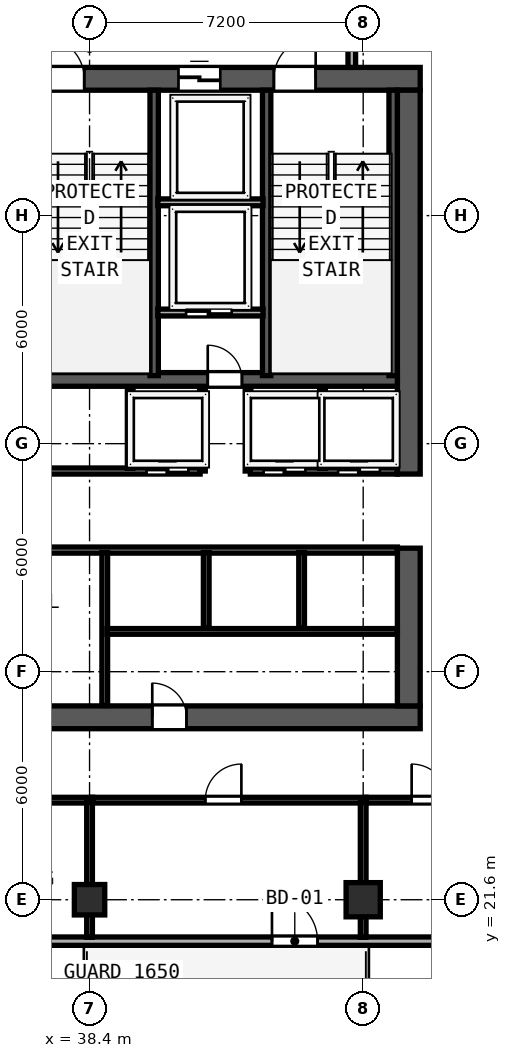
"""IFC4 building model, lengths in metres.
Left out: names, types, materials, properties, quantities, classifications, styles, units other than length and angle.
Written with IfcOpenShell. Run it as: python <this file> out.ifc"""

import sys

from ifc_helpers import new_model, si_unit, direction, frame, frame_2d, origin, origin_2d, place, context, subcontext, project, spatial, rectangle, hollow_rectangle, extrude, element, fill, save


model = new_model("IFC4")
c1 = context("Model", 3, precision=1e-05, world=origin(), true_north=direction((0.0, 1.0)))
c2 = subcontext(c1, "Body", "Model", "MODEL_VIEW")
j1 = project(units=[si_unit("LENGTHUNIT", "METRE"), si_unit("PLANEANGLEUNIT", "RADIAN")], contexts=[c1])
p1 = place(None, origin())
s1 = spatial("IfcSite", under=j1, at=p1, CompositionType="ELEMENT")
p2 = place(p1, origin())
s2 = spatial("IfcBuilding", under=s1, at=p2, CompositionType="ELEMENT")
p3 = place(p2, frame((0.0, 0.0, 199.4)))
s3 = spatial("IfcBuildingStorey", under=s2, at=p3, CompositionType="ELEMENT", Elevation=199.4)
p4 = place(p3, frame((29.7, 26.4, 0.0), z_axis=(0.0, 0.0, 1.0), x_axis=(1.0, 0.0, 0.0)))
e1 = element("IfcWall", 1, at=p4, inside=s3, PredefinedType="SHEAR", context=c2, shape_type="SweptSolid", body=[
    extrude(rectangle(XDim=17.4, YDim=0.6, at=frame_2d((8.7, 0.0))), origin(), (0.0, 0.0, 1.0), 3.62),
])
p5 = place(p4, frame((11.25, 0.0, 0.0), z_axis=(0.0, 0.0, 1.0), x_axis=(-1.0, 0.0, 0.0)))
e2 = element("IfcOpeningElement", 2, at=p5, cuts=e1, PredefinedType="OPENING", context=c2, shape_type="SweptSolid", body=[
    extrude(rectangle(XDim=0.9, YDim=2.1, at=frame_2d((0.45, 1.05))), frame((0.0, 0.31, 0.0), z_axis=(0.0, -1.0, 0.0), x_axis=(1.0, 0.0, 0.0)), (0.0, 0.0, 1.0), 0.62),
])
p6 = place(p3, frame((29.7, 43.2, 0.0), z_axis=(0.0, 0.0, 1.0), x_axis=(1.0, 0.0, 0.0)))
e3 = element("IfcWall", 3, at=p6, inside=s3, PredefinedType="SHEAR", context=c2, shape_type="SweptSolid", body=[
    extrude(rectangle(XDim=17.4, YDim=0.6, at=frame_2d((8.7, 0.0))), origin(), (0.0, 0.0, 1.0), 3.62),
])
p7 = place(p6, frame((2.35, 0.0, 0.0)))
e4 = element("IfcOpeningElement", 4, at=p7, cuts=e3, PredefinedType="OPENING", context=c2, shape_type="SweptSolid", body=[
    extrude(rectangle(XDim=1.1, YDim=2.15, at=frame_2d((0.55, 1.075))), frame((0.0, 0.31, 0.0), z_axis=(0.0, -1.0, 0.0), x_axis=(1.0, 0.0, 0.0)), (0.0, 0.0, 1.0), 0.62),
])
p8 = place(p6, frame((7.46, 0.0, 0.0)))
e5 = element("IfcOpeningElement", 5, at=p8, cuts=e3, PredefinedType="OPENING", context=c2, shape_type="SweptSolid", body=[
    extrude(rectangle(XDim=1.1, YDim=2.15, at=frame_2d((0.55, 1.075))), frame((0.0, 0.31, 0.0), z_axis=(0.0, -1.0, 0.0), x_axis=(1.0, 0.0, 0.0)), (0.0, 0.0, 1.0), 0.62),
])
p9 = place(p6, frame((13.55, 0.0, 0.0)))
e6 = element("IfcOpeningElement", 6, at=p9, cuts=e3, PredefinedType="OPENING", context=c2, shape_type="SweptSolid", body=[
    extrude(rectangle(XDim=1.1, YDim=2.15, at=frame_2d((0.55, 1.075))), frame((0.0, 0.31, 0.0), z_axis=(0.0, -1.0, 0.0), x_axis=(1.0, 0.0, 0.0)), (0.0, 0.0, 1.0), 0.62),
])
p10 = place(p6, frame((4.68, 0.0, 0.0)))
e7 = element("IfcOpeningElement", 7, at=p10, cuts=e3, PredefinedType="OPENING", context=c2, shape_type="SweptSolid", body=[
    extrude(rectangle(XDim=1.1, YDim=2.2, at=frame_2d((0.55, 1.1))), frame((0.0, 0.31, 0.0), z_axis=(0.0, -1.0, 0.0), x_axis=(1.0, 0.0, 0.0)), (0.0, 0.0, 1.0), 0.62),
])
p11 = place(p6, frame((11.04, 0.0, 0.0)))
e8 = element("IfcOpeningElement", 8, at=p11, cuts=e3, PredefinedType="OPENING", context=c2, shape_type="SweptSolid", body=[
    extrude(rectangle(XDim=1.1, YDim=2.2, at=frame_2d((0.55, 1.1))), frame((0.0, 0.31, 0.0), z_axis=(0.0, -1.0, 0.0), x_axis=(1.0, 0.0, 0.0)), (0.0, 0.0, 1.0), 0.62),
])
p12 = place(p3, frame((46.8, 26.7, 0.0), z_axis=(0.0, 0.0, 1.0), x_axis=(0.0, 1.0, 0.0)))
e9 = element("IfcWall", 9, at=p12, inside=s3, PredefinedType="SHEAR", context=c2, shape_type="SweptSolid", body=[
    extrude(rectangle(XDim=4.15, YDim=0.6, at=frame_2d((2.075, 0.0))), origin(), (0.0, 0.0, 1.0), 3.62),
])
p13 = place(p3, frame((46.8, 32.8, 0.0), z_axis=(0.0, 0.0, 1.0), x_axis=(0.0, 1.0, 0.0)))
e10 = element("IfcWall", 10, at=p13, inside=s3, PredefinedType="SHEAR", context=c2, shape_type="SweptSolid", body=[
    extrude(rectangle(XDim=10.1, YDim=0.6, at=frame_2d((5.05, 0.0))), origin(), (0.0, 0.0, 1.0), 3.62),
])
p14 = place(p3, frame((30.3, 35.29, 0.0), z_axis=(0.0, 0.0, 1.0), x_axis=(1.0, 0.0, 0.0)))
e11 = element("IfcWall", 11, at=p14, inside=s3, PredefinedType="SHEAR", context=c2, shape_type="SweptSolid", body=[
    extrude(rectangle(XDim=16.2, YDim=0.36, at=frame_2d((8.1, 0.0))), origin(), (0.0, 0.0, 1.0), 3.62),
])
p15 = place(p14, frame((5.05, 0.0, 0.0), z_axis=(0.0, 0.0, 1.0), x_axis=(-1.0, 0.0, 0.0)))
e12 = element("IfcOpeningElement", 12, at=p15, cuts=e11, PredefinedType="OPENING", context=c2, shape_type="SweptSolid", body=[
    extrude(rectangle(XDim=0.9, YDim=2.1, at=frame_2d((0.45, 1.05))), frame((0.0, 0.19, 0.0), z_axis=(0.0, -1.0, 0.0), x_axis=(1.0, 0.0, 0.0)), (0.0, 0.0, 1.0), 0.38),
])
p16 = place(p14, frame((12.11, 0.0, 0.0), z_axis=(0.0, 0.0, 1.0), x_axis=(-1.0, 0.0, 0.0)))
e13 = element("IfcOpeningElement", 13, at=p16, cuts=e11, PredefinedType="OPENING", context=c2, shape_type="SweptSolid", body=[
    extrude(rectangle(XDim=0.9, YDim=2.1, at=frame_2d((0.45, 1.05))), frame((0.0, 0.19, 0.0), z_axis=(0.0, -1.0, 0.0), x_axis=(1.0, 0.0, 0.0)), (0.0, 0.0, 1.0), 0.38),
])
for number, where, z_axis, x_axis in (
    (14, (40.1, 35.39, 0.0), (0.0, 0.0, 1.0), (0.0, 1.0, 0.0)),
    (15, (43.06, 35.39, 0.0), (0.0, 0.0, 1.0), (0.0, 1.0, 0.0)),
    (16, (46.388, 35.39, 0.0), (0.0, 0.0, 1.0), (0.0, 1.0, 0.0)),
):
    element("IfcWall", number, at=place(p3, frame(where, z_axis=z_axis, x_axis=x_axis)), inside=s3, PredefinedType="SHEAR", context=c2, shape_type="SweptSolid", body=[
        extrude(rectangle(XDim=7.51, YDim=0.22, at=frame_2d((3.755, 0.0))), origin(), (0.0, 0.0, 1.0), 3.62),
    ])
p17 = place(p3, frame((45.6, 21.6, 0.0), z_axis=(0.0, 0.0, 1.0), x_axis=(1.0, 0.0, 0.0)))
e17 = element("IfcColumn", 17, at=p17, inside=s3, PredefinedType="COLUMN", context=c2, shape_type="SweptSolid", body=[
    extrude(hollow_rectangle(XDim=0.9, YDim=0.9, WallThickness=0.034, at=origin_2d()), origin(), (0.0, 0.0, 1.0), 3.8),
])
p18 = place(p3, frame((38.4, 21.6, 0.0), z_axis=(0.0, 0.0, 1.0), x_axis=(1.0, 0.0, 0.0)))
e18 = element("IfcColumn", 18, at=p18, inside=s3, PredefinedType="COLUMN", context=c2, shape_type="SweptSolid", body=[
    extrude(hollow_rectangle(XDim=0.8, YDim=0.8, WallThickness=0.03, at=origin_2d()), origin(), (0.0, 0.0, 1.0), 3.8),
])
p19 = place(p3, frame((28.759, 20.51, 0.0), z_axis=(0.0, 0.0, 1.0), x_axis=(1.0, 0.0, 0.0)))
e19 = element("IfcWall", 19, at=p19, inside=s3, PredefinedType="SOLIDWALL", context=c2, shape_type="SweptSolid", body=[
    extrude(rectangle(XDim=19.283, YDim=0.22, at=frame_2d((9.642, 0.0))), origin(), (0.0, 0.0, 1.0), 3.62),
])
p20 = place(p19, frame((15.641, 0.0, 0.0), z_axis=(0.0, 0.0, 1.0), x_axis=(-1.0, 0.0, 0.0)))
e20 = element("IfcOpeningElement", 20, at=p20, cuts=e19, PredefinedType="OPENING", context=c2, shape_type="SweptSolid", body=[
    extrude(rectangle(XDim=1.2, YDim=2.15, at=frame_2d((0.6, 1.075))), frame((0.0, 0.12, 0.0), z_axis=(0.0, -1.0, 0.0), x_axis=(1.0, 0.0, 0.0)), (0.0, 0.0, 1.0), 0.24),
])
p21 = place(p3, frame((45.3, 43.5, 0.0), z_axis=(0.0, 0.0, 1.0), x_axis=(0.0, 1.0, 0.0)))
e21 = element("IfcWall", 21, at=p21, inside=s3, PredefinedType="SOLIDWALL", context=c2, shape_type="SweptSolid", body=[
    extrude(rectangle(XDim=2.935, YDim=0.2, at=frame_2d((1.468, 0.0))), origin(), (0.0, 0.0, 1.0), 3.62),
])
p22 = place(p21, frame((0.7, 0.0, 0.0)))
e22 = element("IfcOpeningElement", 22, at=p22, cuts=e21, PredefinedType="OPENING", context=c2, shape_type="SweptSolid", body=[
    extrude(rectangle(XDim=1.1, YDim=2.15, at=frame_2d((0.55, 1.075))), frame((0.0, 0.11, 0.0), z_axis=(0.0, -1.0, 0.0), x_axis=(1.0, 0.0, 0.0)), (0.0, 0.0, 1.0), 0.22),
])
p23 = place(p3, frame((40.195, 39.95, 0.0), z_axis=(0.0, 0.0, 1.0), x_axis=(1.0, 0.0, 0.0)))
e23 = element("IfcWall", 23, at=p23, inside=s3, PredefinedType="SOLIDWALL", context=c2, shape_type="SweptSolid", body=[
    extrude(rectangle(XDim=2.77, YDim=0.18, at=frame_2d((1.385, 0.0))), origin(), (0.0, 0.0, 1.0), 3.62),
])
p24 = place(p3, frame((40.195, 37.05, 0.0), z_axis=(0.0, 0.0, 1.0), x_axis=(1.0, 0.0, 0.0)))
e24 = element("IfcWall", 24, at=p24, inside=s3, PredefinedType="SOLIDWALL", context=c2, shape_type="SweptSolid", body=[
    extrude(rectangle(XDim=2.77, YDim=0.18, at=frame_2d((1.385, 0.0))), origin(), (0.0, 0.0, 1.0), 3.62),
])
p25 = place(p24, frame((1.945, 0.0, 0.0), z_axis=(0.0, 0.0, 1.0), x_axis=(-1.0, 0.0, 0.0)))
e25 = element("IfcOpeningElement", 25, at=p25, cuts=e24, PredefinedType="OPENING", context=c2, shape_type="SweptSolid", body=[
    extrude(rectangle(XDim=1.2, YDim=2.2, at=frame_2d((0.6, 1.1))), frame((0.0, 0.1, 0.0), z_axis=(0.0, -1.0, 0.0), x_axis=(1.0, 0.0, 0.0)), (0.0, 0.0, 1.0), 0.2),
])
for number, where, z_axis, x_axis in (
    (26, (41.37, 32.88, 0.0), (0.0, 0.0, 1.0), (0.0, 1.0, 0.0)),
    (27, (42.57, 32.88, 0.0), (0.0, 0.0, 1.0), (0.0, 1.0, 0.0)),
):
    element("IfcWall", number, at=place(p3, frame(where, z_axis=z_axis, x_axis=x_axis)), inside=s3, PredefinedType="SOLIDWALL", context=c2, shape_type="SweptSolid", body=[
        extrude(rectangle(XDim=2.17, YDim=0.15, at=frame_2d((1.085, 0.0))), origin(), (0.0, 0.0, 1.0), 3.62),
    ])
p26 = place(p3, frame((35.57, 32.88, 0.0), z_axis=(0.0, 0.0, 1.0), x_axis=(1.0, 0.0, 0.0)))
e28 = element("IfcWall", 28, at=p26, inside=s3, PredefinedType="SOLIDWALL", context=c2, shape_type="SweptSolid", body=[
    extrude(rectangle(XDim=5.74, YDim=0.16, at=frame_2d((2.87, 0.0))), origin(), (0.0, 0.0, 1.0), 3.62),
])
p27 = place(p26, frame((1.49, 0.0, 0.0), z_axis=(0.0, 0.0, 1.0), x_axis=(-1.0, 0.0, 0.0)))
e29 = element("IfcOpeningElement", 29, at=p27, cuts=e28, PredefinedType="OPENING", context=c2, shape_type="SweptSolid", body=[
    extrude(rectangle(XDim=0.95, YDim=2.12, at=frame_2d((0.475, 1.06))), frame((0.0, 0.09, 0.0), z_axis=(0.0, -1.0, 0.0), x_axis=(1.0, 0.0, 0.0)), (0.0, 0.0, 1.0), 0.18),
])
p28 = place(p26, frame((5.43, 0.0, 0.0), z_axis=(0.0, 0.0, 1.0), x_axis=(-1.0, 0.0, 0.0)))
e30 = element("IfcOpeningElement", 30, at=p28, cuts=e28, PredefinedType="OPENING", context=c2, shape_type="SweptSolid", body=[
    extrude(rectangle(XDim=1.1, YDim=2.2, at=frame_2d((0.55, 1.1))), frame((0.0, 0.09, 0.0), z_axis=(0.0, -1.0, 0.0), x_axis=(1.0, 0.0, 0.0)), (0.0, 0.0, 1.0), 0.18),
])
p29 = place(p3, frame((42.63, 32.88, 0.0), z_axis=(0.0, 0.0, 1.0), x_axis=(1.0, 0.0, 0.0)))
e31 = element("IfcWall", 31, at=p29, inside=s3, PredefinedType="SOLIDWALL", context=c2, shape_type="SweptSolid", body=[
    extrude(rectangle(XDim=3.87, YDim=0.16, at=frame_2d((1.935, 0.0))), origin(), (0.0, 0.0, 1.0), 3.62),
])
p30 = place(p29, frame((1.45, 0.0, 0.0), z_axis=(0.0, 0.0, 1.0), x_axis=(-1.0, 0.0, 0.0)))
e32 = element("IfcOpeningElement", 32, at=p30, cuts=e31, PredefinedType="OPENING", context=c2, shape_type="SweptSolid", body=[
    extrude(rectangle(XDim=1.1, YDim=2.2, at=frame_2d((0.55, 1.1))), frame((0.0, 0.09, 0.0), z_axis=(0.0, -1.0, 0.0), x_axis=(1.0, 0.0, 0.0)), (0.0, 0.0, 1.0), 0.18),
])
p31 = place(p29, frame((3.41, 0.0, 0.0), z_axis=(0.0, 0.0, 1.0), x_axis=(-1.0, 0.0, 0.0)))
e33 = element("IfcOpeningElement", 33, at=p31, cuts=e31, PredefinedType="OPENING", context=c2, shape_type="SweptSolid", body=[
    extrude(rectangle(XDim=1.1, YDim=2.2, at=frame_2d((0.55, 1.1))), frame((0.0, 0.09, 0.0), z_axis=(0.0, -1.0, 0.0), x_axis=(1.0, 0.0, 0.0)), (0.0, 0.0, 1.0), 0.18),
])
for number, where, z_axis, x_axis in (
    (34, (39.47, 32.95, 0.0), (0.0, 0.0, 1.0), (0.0, 1.0, 0.0)),
    (35, (44.53, 32.95, 0.0), (0.0, 0.0, 1.0), (0.0, 1.0, 0.0)),
):
    element("IfcWall", number, at=place(p3, frame(where, z_axis=z_axis, x_axis=x_axis)), inside=s3, PredefinedType="SOLIDWALL", context=c2, shape_type="SweptSolid", body=[
        extrude(rectangle(XDim=2.05, YDim=0.15, at=frame_2d((1.025, 0.0))), origin(), (0.0, 0.0, 1.0), 3.62),
    ])
p32 = place(p3, frame((30.3, 30.8, 0.0), z_axis=(0.0, 0.0, 1.0), x_axis=(1.0, 0.0, 0.0)))
e36 = element("IfcWall", 36, at=p32, inside=s3, PredefinedType="SOLIDWALL", context=c2, shape_type="SweptSolid", body=[
    extrude(rectangle(XDim=16.2, YDim=0.16, at=frame_2d((8.1, 0.0))), origin(), (0.0, 0.0, 1.0), 3.62),
])
p33 = place(p32, frame((2.2, 0.0, 0.0)))
e37 = element("IfcOpeningElement", 37, at=p33, cuts=e36, PredefinedType="OPENING", context=c2, shape_type="SweptSolid", body=[
    extrude(rectangle(XDim=0.95, YDim=2.12, at=frame_2d((0.475, 1.06))), frame((0.0, 0.09, 0.0), z_axis=(0.0, -1.0, 0.0), x_axis=(1.0, 0.0, 0.0)), (0.0, 0.0, 1.0), 0.18),
])
p34 = place(p3, frame((38.8, 26.71, 0.0), z_axis=(0.0, 0.0, 1.0), x_axis=(0.0, 1.0, 0.0)))
e38 = element("IfcWall", 38, at=p34, inside=s3, PredefinedType="SOLIDWALL", context=c2, shape_type="SweptSolid", body=[
    extrude(rectangle(XDim=4.025, YDim=0.15, at=frame_2d((2.013, 0.0))), origin(), (0.0, 0.0, 1.0), 3.62),
])
p35 = place(p3, frame((38.86, 28.66, 0.0), z_axis=(0.0, 0.0, 1.0), x_axis=(1.0, 0.0, 0.0)))
e39 = element("IfcWall", 39, at=p35, inside=s3, PredefinedType="PARTITIONING", context=c2, shape_type="SweptSolid", body=[
    extrude(rectangle(XDim=7.64, YDim=0.15, at=frame_2d((3.82, 0.0))), origin(), (0.0, 0.0, 1.0), 3.62),
])
for number, where, z_axis, x_axis in (
    (40, (41.47, 28.75, 0.0), (0.0, 0.0, 1.0), (0.0, 1.0, 0.0)),
    (41, (43.98, 28.75, 0.0), (0.0, 0.0, 1.0), (0.0, 1.0, 0.0)),
):
    element("IfcWall", number, at=place(p3, frame(where, z_axis=z_axis, x_axis=x_axis)), inside=s3, PredefinedType="SOLIDWALL", context=c2, shape_type="SweptSolid", body=[
        extrude(rectangle(XDim=1.985, YDim=0.15, at=frame_2d((0.993, 0.0))), origin(), (0.0, 0.0, 1.0), 3.62),
    ])
p36 = place(p3, frame((23.92, 24.22, 0.0), z_axis=(0.0, 0.0, 1.0), x_axis=(1.0, 0.0, 0.0)))
e42 = element("IfcWall", 42, at=p36, inside=s3, PredefinedType="PARTITIONING", context=c2, shape_type="SweptSolid", body=[
    extrude(rectangle(XDim=14.56, YDim=0.15, at=frame_2d((7.28, 0.0))), origin(), (0.0, 0.0, 1.0), 3.62),
])
p37 = place(p36, frame((9.445, 0.0, 0.0), z_axis=(0.0, 0.0, 1.0), x_axis=(-1.0, 0.0, 0.0)))
e43 = element("IfcOpeningElement", 43, at=p37, cuts=e42, PredefinedType="OPENING", context=c2, shape_type="SweptSolid", body=[
    extrude(rectangle(XDim=0.95, YDim=2.12, at=frame_2d((0.475, 1.06))), frame((0.0, 0.085, 0.0), z_axis=(0.0, -1.0, 0.0), x_axis=(1.0, 0.0, 0.0)), (0.0, 0.0, 1.0), 0.17),
])
p38 = place(p3, frame((38.4, 20.612, 0.0), z_axis=(0.0, 0.0, 1.0), x_axis=(0.0, 1.0, 0.0)))
e44 = element("IfcWall", 44, at=p38, inside=s3, PredefinedType="PARTITIONING", context=c2, shape_type="SweptSolid", body=[
    extrude(rectangle(XDim=3.548, YDim=0.15, at=frame_2d((1.774, 0.0))), origin(), (0.0, 0.0, 1.0), 3.105),
])
p39 = place(p3, frame((38.482, 24.22, 0.0), z_axis=(0.0, 0.0, 1.0), x_axis=(1.0, 0.0, 0.0)))
e45 = element("IfcWall", 45, at=p39, inside=s3, PredefinedType="PARTITIONING", context=c2, shape_type="SweptSolid", body=[
    extrude(rectangle(XDim=7.198, YDim=0.15, at=frame_2d((3.599, 0.0))), origin(), (0.0, 0.0, 1.0), 3.62),
])
p40 = place(p39, frame((3.913, 0.0, 0.0), z_axis=(0.0, 0.0, 1.0), x_axis=(-1.0, 0.0, 0.0)))
e46 = element("IfcOpeningElement", 46, at=p40, cuts=e45, PredefinedType="OPENING", context=c2, shape_type="SweptSolid", body=[
    extrude(rectangle(XDim=0.95, YDim=2.12, at=frame_2d((0.475, 1.06))), frame((0.0, 0.085, 0.0), z_axis=(0.0, -1.0, 0.0), x_axis=(1.0, 0.0, 0.0)), (0.0, 0.0, 1.0), 0.17),
])
p41 = place(p3, frame((45.6, 20.612, 0.0), z_axis=(0.0, 0.0, 1.0), x_axis=(0.0, 1.0, 0.0)))
e47 = element("IfcWall", 47, at=p41, inside=s3, PredefinedType="PARTITIONING", context=c2, shape_type="SweptSolid", body=[
    extrude(rectangle(XDim=3.548, YDim=0.15, at=frame_2d((1.774, 0.0))), origin(), (0.0, 0.0, 1.0), 3.105),
])
p42 = place(p3, frame((45.682, 24.22, 0.0), z_axis=(0.0, 0.0, 1.0), x_axis=(1.0, 0.0, 0.0)))
e48 = element("IfcWall", 48, at=p42, inside=s3, PredefinedType="PARTITIONING", context=c2, shape_type="SweptSolid", body=[
    extrude(rectangle(XDim=7.198, YDim=0.15, at=frame_2d((3.599, 0.0))), origin(), (0.0, 0.0, 1.0), 3.62),
])
p43 = place(p42, frame((2.143, 0.0, 0.0), z_axis=(0.0, 0.0, 1.0), x_axis=(-1.0, 0.0, 0.0)))
e49 = element("IfcOpeningElement", 49, at=p43, cuts=e48, PredefinedType="OPENING", context=c2, shape_type="SweptSolid", body=[
    extrude(rectangle(XDim=0.95, YDim=2.12, at=frame_2d((0.475, 1.06))), frame((0.0, 0.085, 0.0), z_axis=(0.0, -1.0, 0.0), x_axis=(1.0, 0.0, 0.0)), (0.0, 0.0, 1.0), 0.17),
])
p44 = place(p20, origin())
e50 = element("IfcDoor", 50, at=p44, inside=s3, OperationType="SINGLE_SWING_RIGHT", PredefinedType="DOOR", context=c2, shape_type="SweptSolid", body=[
    extrude(rectangle(XDim=1.2, YDim=2.15, at=frame_2d((0.6, 1.075))), frame((0.0, 0.025, 0.0), z_axis=(0.0, -1.0, 0.0), x_axis=(1.0, 0.0, 0.0)), (0.0, 0.0, 1.0), 0.05),
])
fill(e20, e50)
p45 = place(p8, origin())
e51 = element("IfcDoor", 51, at=p45, inside=s3, OperationType="SINGLE_SWING_LEFT", PredefinedType="DOOR", context=c2, shape_type="SweptSolid", body=[
    extrude(rectangle(XDim=1.1, YDim=2.15, at=frame_2d((0.55, 1.075))), frame((0.0, 0.185, 0.0), z_axis=(0.0, -1.0, 0.0), x_axis=(1.0, 0.0, 0.0)), (0.0, 0.0, 1.0), 0.05),
])
fill(e5, e51)
p46 = place(p9, origin())
e52 = element("IfcDoor", 52, at=p46, inside=s3, OperationType="SINGLE_SWING_RIGHT", PredefinedType="DOOR", context=c2, shape_type="SweptSolid", body=[
    extrude(rectangle(XDim=1.1, YDim=2.15, at=frame_2d((0.55, 1.075))), frame((0.0, 0.185, 0.0), z_axis=(0.0, -1.0, 0.0), x_axis=(1.0, 0.0, 0.0)), (0.0, 0.0, 1.0), 0.05),
])
fill(e6, e52)
p47 = place(p11, origin())
e53 = element("IfcDoor", 53, at=p47, inside=s3, OperationType="SLIDING_TO_LEFT", PredefinedType="DOOR", context=c2, shape_type="SweptSolid", body=[
    extrude(rectangle(XDim=1.1, YDim=2.2, at=frame_2d((0.55, 1.1))), frame((0.0, 0.185, 0.0), z_axis=(0.0, -1.0, 0.0), x_axis=(1.0, 0.0, 0.0)), (0.0, 0.0, 1.0), 0.05),
])
fill(e8, e53)
p48 = place(p25, origin())
e54 = element("IfcDoor", 54, at=p48, inside=s3, OperationType="SLIDING_TO_RIGHT", PredefinedType="DOOR", context=c2, shape_type="SweptSolid", body=[
    extrude(rectangle(XDim=1.2, YDim=2.2, at=frame_2d((0.6, 1.1))), frame((0.0, 0.025, 0.0), z_axis=(0.0, -1.0, 0.0), x_axis=(1.0, 0.0, 0.0)), (0.0, 0.0, 1.0), 0.05),
])
fill(e25, e54)
p49 = place(p16, origin())
e55 = element("IfcDoor", 55, at=p49, inside=s3, OperationType="SINGLE_SWING_RIGHT", PredefinedType="DOOR", context=c2, shape_type="SweptSolid", body=[
    extrude(rectangle(XDim=0.9, YDim=2.1, at=frame_2d((0.45, 1.05))), frame((0.0, 0.025, 0.0), z_axis=(0.0, -1.0, 0.0), x_axis=(1.0, 0.0, 0.0)), (0.0, 0.0, 1.0), 0.05),
])
fill(e13, e55)
p50 = place(p28, origin())
e56 = element("IfcDoor", 56, at=p50, inside=s3, OperationType="SLIDING_TO_RIGHT", PredefinedType="DOOR", context=c2, shape_type="SweptSolid", body=[
    extrude(rectangle(XDim=1.1, YDim=2.2, at=frame_2d((0.55, 1.1))), frame((0.0, 0.025, 0.0), z_axis=(0.0, -1.0, 0.0), x_axis=(1.0, 0.0, 0.0)), (0.0, 0.0, 1.0), 0.05),
])
fill(e30, e56)
p51 = place(p30, origin())
e57 = element("IfcDoor", 57, at=p51, inside=s3, OperationType="SLIDING_TO_RIGHT", PredefinedType="DOOR", context=c2, shape_type="SweptSolid", body=[
    extrude(rectangle(XDim=1.1, YDim=2.2, at=frame_2d((0.55, 1.1))), frame((0.0, 0.025, 0.0), z_axis=(0.0, -1.0, 0.0), x_axis=(1.0, 0.0, 0.0)), (0.0, 0.0, 1.0), 0.05),
])
fill(e32, e57)
p52 = place(p31, origin())
e58 = element("IfcDoor", 58, at=p52, inside=s3, OperationType="SLIDING_TO_RIGHT", PredefinedType="DOOR", context=c2, shape_type="SweptSolid", body=[
    extrude(rectangle(XDim=1.1, YDim=2.2, at=frame_2d((0.55, 1.1))), frame((0.0, 0.025, 0.0), z_axis=(0.0, -1.0, 0.0), x_axis=(1.0, 0.0, 0.0)), (0.0, 0.0, 1.0), 0.05),
])
fill(e33, e58)
p53 = place(p5, origin())
e59 = element("IfcDoor", 59, at=p53, inside=s3, OperationType="SINGLE_SWING_RIGHT", PredefinedType="DOOR", context=c2, shape_type="SweptSolid", body=[
    extrude(rectangle(XDim=0.9, YDim=2.1, at=frame_2d((0.45, 1.05))), frame((0.0, -0.195, 0.0), z_axis=(0.0, -1.0, 0.0), x_axis=(1.0, 0.0, 0.0)), (0.0, 0.0, 1.0), 0.05),
])
fill(e2, e59)
p54 = place(p40, origin())
e60 = element("IfcDoor", 60, at=p54, inside=s3, OperationType="SINGLE_SWING_LEFT", PredefinedType="DOOR", context=c2, shape_type="SweptSolid", body=[
    extrude(rectangle(XDim=0.95, YDim=2.12, at=frame_2d((0.475, 1.06))), frame((0.0, 0.025, 0.0), z_axis=(0.0, -1.0, 0.0), x_axis=(1.0, 0.0, 0.0)), (0.0, 0.0, 1.0), 0.05),
])
fill(e46, e60)
p55 = place(p43, origin())
e61 = element("IfcDoor", 61, at=p55, inside=s3, OperationType="SINGLE_SWING_RIGHT", PredefinedType="DOOR", context=c2, shape_type="SweptSolid", body=[
    extrude(rectangle(XDim=0.95, YDim=2.12, at=frame_2d((0.475, 1.06))), frame((0.0, 0.025, 0.0), z_axis=(0.0, -1.0, 0.0), x_axis=(1.0, 0.0, 0.0)), (0.0, 0.0, 1.0), 0.05),
])
fill(e49, e61)
save(model, sys.argv[1])
